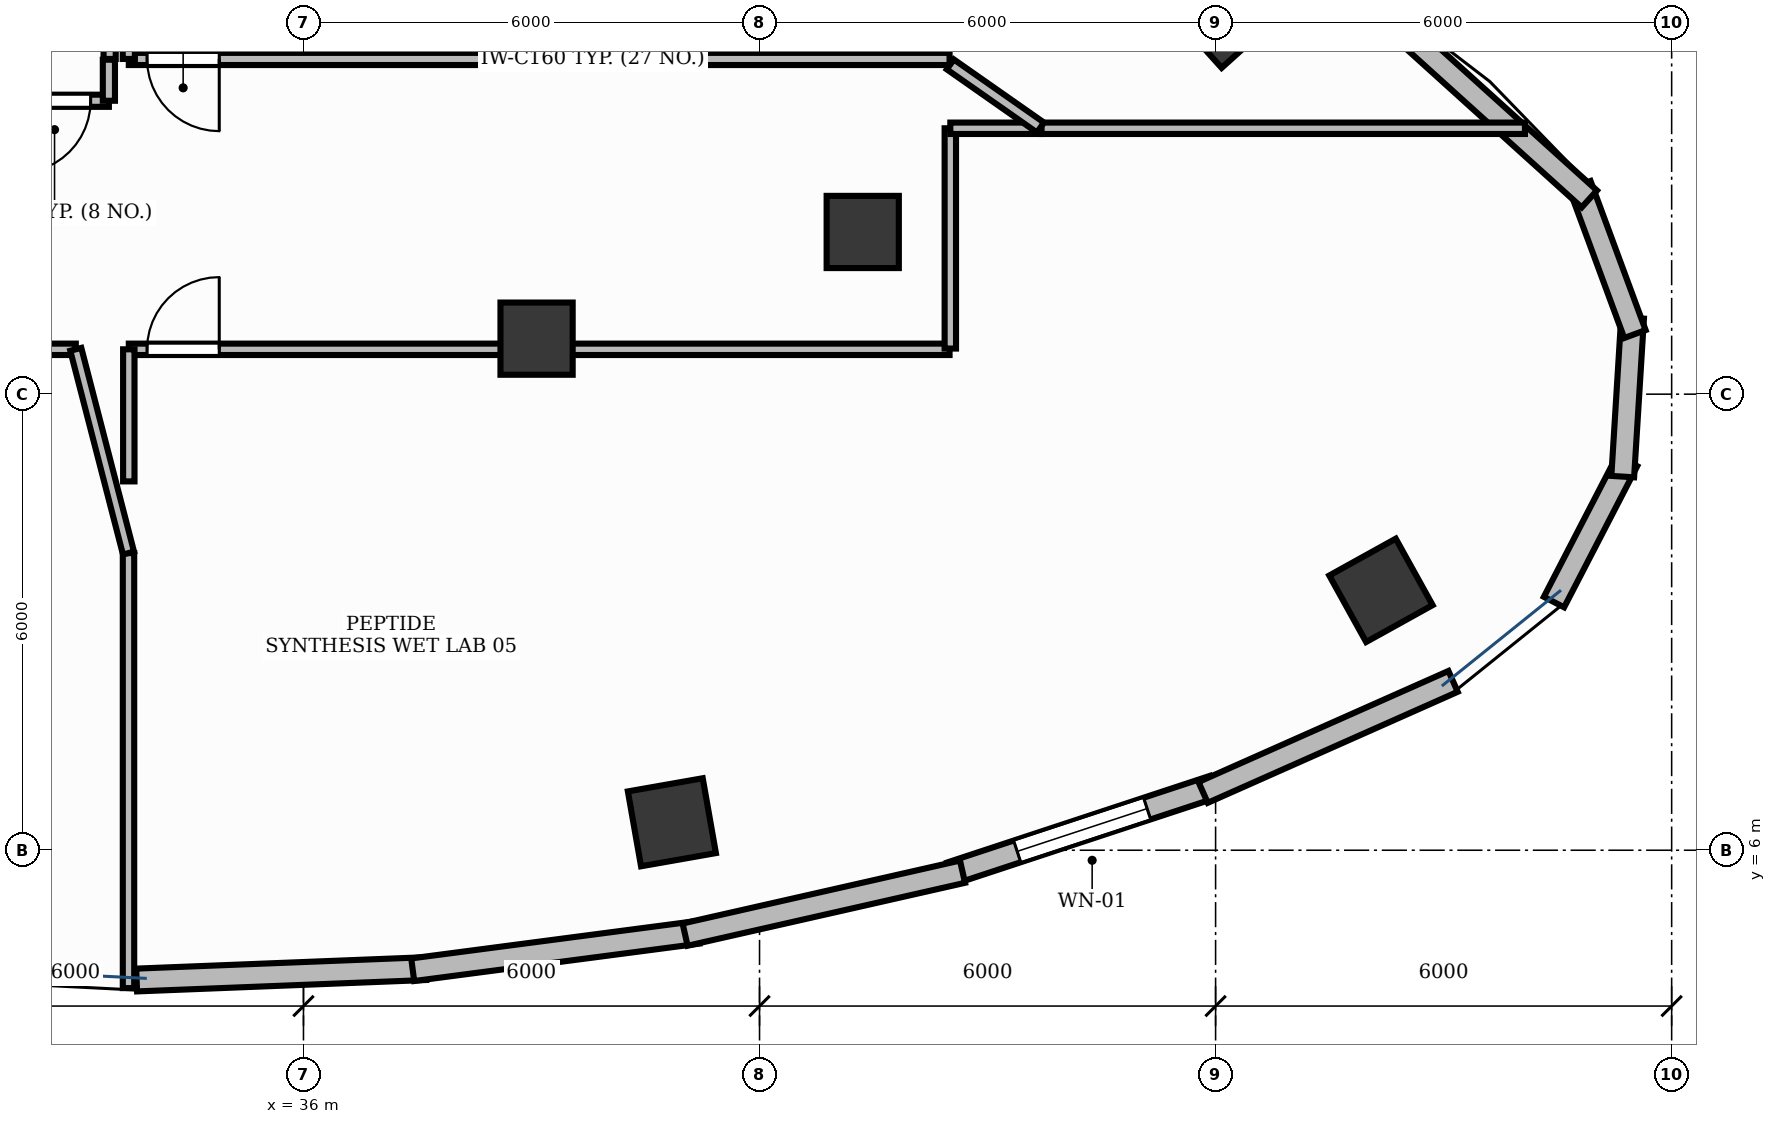
"""IFC4 building model, lengths in metres.
Left out: names, types, materials, properties, quantities, classifications, styles, units other than length and angle.
Written with IfcOpenShell. Run it as: python <this file> out.ifc"""

import sys

from ifc_helpers import new_model, si_unit, direction, frame, frame_2d, origin, origin_2d, place, context, subcontext, project, spatial, rectangle, extrude, element, fill, save


model = new_model("IFC4")
c1 = context("Model", 3, precision=1e-05, world=origin(), true_north=direction((0.0, 1.0)))
c2 = subcontext(c1, "Body", "Model", "MODEL_VIEW")
j1 = project(units=[si_unit("LENGTHUNIT", "METRE"), si_unit("PLANEANGLEUNIT", "RADIAN")], contexts=[c1])
p1 = place(None, origin())
s1 = spatial("IfcSite", under=j1, at=p1, CompositionType="ELEMENT")
p2 = place(p1, origin())
s2 = spatial("IfcBuilding", under=s1, at=p2, CompositionType="ELEMENT")
p3 = place(p2, frame((0.0, 0.0, 231.0)))
s3 = spatial("IfcBuildingStorey", under=s2, at=p3, CompositionType="ELEMENT", Elevation=231.0)
p4 = place(p3, frame((40.847, 6.368, -0.0), z_axis=(0.0, 0.0, 1.0), x_axis=(0.984868307662, 0.173304404339, 0.0)))
e1 = element("IfcColumn", 1, at=p4, inside=s3, PredefinedType="COLUMN", context=c2, shape_type="SweptSolid", body=[
    extrude(rectangle(XDim=1.0, YDim=1.0, at=origin_2d()), origin(), (0.0, 0.0, 1.0), 3.901),
])
p5 = place(p3, frame((39.067, 12.73, -0.0), z_axis=(0.0, 0.0, 1.0), x_axis=(1.0, 0.0, 0.0)))
e2 = element("IfcColumn", 2, at=p5, inside=s3, PredefinedType="COLUMN", context=c2, shape_type="SweptSolid", body=[
    extrude(rectangle(XDim=0.95, YDim=0.95, at=origin_2d()), origin(), (0.0, 0.0, 1.0), 3.901),
])
p6 = place(p3, frame((50.176, 9.419, -0.0), z_axis=(0.0, 0.0, 1.0), x_axis=(0.874535078577, 0.484962262797, 0.0)))
e3 = element("IfcColumn", 3, at=p6, inside=s3, PredefinedType="COLUMN", context=c2, shape_type="SweptSolid", body=[
    extrude(rectangle(XDim=1.0, YDim=1.0, at=origin_2d()), origin(), (0.0, 0.0, 1.0), 3.901),
])
p7 = place(p3, frame((43.358, 14.134, -0.0), z_axis=(0.0, 0.0, 1.0), x_axis=(1.0, 0.0, 0.0)))
e4 = element("IfcColumn", 4, at=p7, inside=s3, PredefinedType="COLUMN", context=c2, shape_type="SweptSolid", body=[
    extrude(rectangle(XDim=0.95, YDim=0.95, at=origin_2d()), origin(), (0.0, 0.0, 1.0), 3.901),
])
p8 = place(p3, frame((48.116, 16.999, -0.0), z_axis=(0.0, 0.0, 1.0), x_axis=(-0.669130606359, 0.743144825477, 0.0)))
e5 = element("IfcColumn", 5, at=p8, inside=s3, PredefinedType="COLUMN", context=c2, shape_type="SweptSolid", body=[
    extrude(rectangle(XDim=1.0, YDim=1.0, at=origin_2d()), origin(), (0.0, 0.0, 1.0), 3.901),
])
p9 = place(p3, frame((44.516, 5.697, 0.0), z_axis=(0.0, 0.0, 1.0), x_axis=(0.949704682455, 0.313146956114, 0.0)))
e6 = element("IfcWall", 6, at=p9, inside=s3, PredefinedType="STANDARD", context=c2, shape_type="SweptSolid", body=[
    extrude(rectangle(XDim=3.639, YDim=0.3, at=frame_2d((1.82, 0.0))), origin(), (0.0, 0.0, 1.0), 3.9),
])
p10 = place(p9, frame((0.92, 0.0, 0.9)))
e7 = element("IfcOpeningElement", 7, at=p10, cuts=e6, PredefinedType="OPENING", context=c2, shape_type="SweptSolid", body=[
    extrude(rectangle(XDim=1.8, YDim=2.1, at=frame_2d((0.9, 1.05))), frame((0.0, 0.165, 0.0), z_axis=(0.0, -1.0, 0.0), x_axis=(1.0, 0.0, 0.0)), (0.0, 0.0, 1.0), 0.33),
])
p11 = place(p3, frame((33.805, 4.292, 0.0), z_axis=(0.0, 0.0, 1.0), x_axis=(0.999221923177, 0.039440439173, 0.0)))
e8 = element("IfcWall", 8, at=p11, inside=s3, PredefinedType="STANDARD", context=c2, shape_type="SweptSolid", body=[
    extrude(rectangle(XDim=3.807, YDim=0.3, at=frame_2d((1.903, 0.0))), origin(), (0.0, 0.0, 1.0), 3.9),
])
p12 = place(p3, frame((37.437, 4.428, 0.0), z_axis=(0.0, 0.0, 1.0), x_axis=(0.991512801574, 0.130009093201, 0.0)))
e9 = element("IfcWall", 9, at=p12, inside=s3, PredefinedType="STANDARD", context=c2, shape_type="SweptSolid", body=[
    extrude(rectangle(XDim=3.786, YDim=0.3, at=frame_2d((1.893, 0.0))), origin(), (0.0, 0.0, 1.0), 3.9),
])
p13 = place(p3, frame((41.021, 4.89, 0.0), z_axis=(0.0, 0.0, 1.0), x_axis=(0.975241674184, 0.221141757557, 0.0)))
e10 = element("IfcWall", 10, at=p13, inside=s3, PredefinedType="STANDARD", context=c2, shape_type="SweptSolid", body=[
    extrude(rectangle(XDim=3.743, YDim=0.3, at=frame_2d((1.871, 0.0))), origin(), (0.0, 0.0, 1.0), 3.9),
])
p14 = place(p3, frame((47.836, 6.761, 0.0), z_axis=(0.0, 0.0, 1.0), x_axis=(0.913940198441, 0.405848880341, 0.0)))
e11 = element("IfcWall", 11, at=p14, inside=s3, PredefinedType="STANDARD", context=c2, shape_type="SweptSolid", body=[
    extrude(rectangle(XDim=3.598, YDim=0.3, at=frame_2d((1.799, 0.0))), origin(), (0.0, 0.0, 1.0), 3.9),
])
p15 = place(p3, frame((52.452, 9.265, 0.0), z_axis=(0.0, 0.0, 1.0), x_axis=(0.459683297138, 0.888082916361, 0.0)))
e12 = element("IfcWall", 12, at=p15, inside=s3, PredefinedType="STANDARD", context=c2, shape_type="SweptSolid", body=[
    extrude(rectangle(XDim=2.092, YDim=0.3, at=frame_2d((1.046, 0.0))), origin(), (0.0, 0.0, 1.0), 3.9),
])
for number, where, z_axis, x_axis in (
    (13, (53.356, 10.915, 0.0), (0.0, 0.0, 1.0), (0.062, 0.998, 0.0)),
    (14, (53.517, 12.791, 0.0), (0.0, 0.0, 1.0), (-0.346, 0.938, 0.0)),
):
    element("IfcWall", number, at=place(p3, frame(where, z_axis=z_axis, x_axis=x_axis)), inside=s3, PredefinedType="STANDARD", context=c2, shape_type="SweptSolid", body=[
        extrude(rectangle(XDim=2.091, YDim=0.3, at=frame_2d((1.046, 0.0))), origin(), (0.0, 0.0, 1.0), 3.9),
    ])
p16 = place(p3, frame((52.917, 14.569, 0.0), z_axis=(0.0, 0.0, 1.0), x_axis=(-0.742037796493, 0.670358045059, 0.0)))
e15 = element("IfcWall", 15, at=p16, inside=s3, PredefinedType="STANDARD", context=c2, shape_type="SweptSolid", body=[
    extrude(rectangle(XDim=3.685, YDim=0.3, at=frame_2d((1.843, 0.0))), origin(), (0.0, 0.0, 1.0), 3.9),
])
p17 = place(p3, frame((33.44, 15.86, 0.0), z_axis=(0.0, 0.0, 1.0), x_axis=(-1.0, 0.0, 0.0)))
e16 = element("IfcWall", 16, at=p17, inside=s3, PredefinedType="PARTITIONING", context=c2, shape_type="SweptSolid", body=[
    extrude(rectangle(XDim=3.28, YDim=0.16, at=frame_2d((1.64, 0.0))), origin(), (0.0, 0.0, 1.0), 2.91),
])
p18 = place(p17, frame((0.24, 0.0, 0.0)))
e17 = element("IfcOpeningElement", 17, at=p18, cuts=e16, PredefinedType="OPENING", context=c2, shape_type="SweptSolid", body=[
    extrude(rectangle(XDim=0.95, YDim=2.15, at=frame_2d((0.475, 1.075))), frame((0.0, 0.095, 0.0), z_axis=(0.0, -1.0, 0.0), x_axis=(1.0, 0.0, 0.0)), (0.0, 0.0, 1.0), 0.19),
])
p19 = place(p3, frame((20.698, 12.59, 0.0), z_axis=(0.0, 0.0, 1.0), x_axis=(1.0, 0.0, 0.0)))
e18 = element("IfcWall", 18, at=p19, inside=s3, PredefinedType="PARTITIONING", context=c2, shape_type="SweptSolid", body=[
    extrude(rectangle(XDim=12.307, YDim=0.15, at=frame_2d((6.153, 0.0))), origin(), (0.0, 0.0, 1.0), 2.91),
])
p20 = place(p19, frame((5.927, 0.0, 0.0)))
e19 = element("IfcOpeningElement", 19, at=p20, cuts=e18, PredefinedType="OPENING", context=c2, shape_type="SweptSolid", body=[
    extrude(rectangle(XDim=0.95, YDim=2.15, at=frame_2d((0.475, 1.075))), frame((0.0, 0.09, 0.0), z_axis=(0.0, -1.0, 0.0), x_axis=(1.0, 0.0, 0.0)), (0.0, 0.0, 1.0), 0.18),
])
p21 = place(p3, frame((33.702, 12.59, 0.0), z_axis=(0.0, 0.0, 1.0), x_axis=(1.0, 0.0, 0.0)))
e20 = element("IfcWall", 20, at=p21, inside=s3, PredefinedType="PARTITIONING", context=c2, shape_type="SweptSolid", body=[
    extrude(rectangle(XDim=10.798, YDim=0.15, at=frame_2d((5.399, 0.0))), origin(), (0.0, 0.0, 1.0), 2.91),
])
p22 = place(p21, frame((0.24, 0.0, 0.0)))
e21 = element("IfcOpeningElement", 21, at=p22, cuts=e20, PredefinedType="OPENING", context=c2, shape_type="SweptSolid", body=[
    extrude(rectangle(XDim=0.95, YDim=2.15, at=frame_2d((0.475, 1.075))), frame((0.0, 0.09, 0.0), z_axis=(0.0, -1.0, 0.0), x_axis=(1.0, 0.0, 0.0)), (0.0, 0.0, 1.0), 0.18),
])
p23 = place(p3, frame((44.5, 16.41, 0.0), z_axis=(0.0, 0.0, 1.0), x_axis=(-1.0, 0.0, 0.0)))
e22 = element("IfcWall", 22, at=p23, inside=s3, PredefinedType="PARTITIONING", context=c2, shape_type="SweptSolid", body=[
    extrude(rectangle(XDim=10.798, YDim=0.16, at=frame_2d((5.399, 0.0))), origin(), (0.0, 0.0, 1.0), 2.91),
])
p24 = place(p23, frame((9.608, 0.0, 0.0)))
e23 = element("IfcOpeningElement", 23, at=p24, cuts=e22, PredefinedType="OPENING", context=c2, shape_type="SweptSolid", body=[
    extrude(rectangle(XDim=0.95, YDim=2.15, at=frame_2d((0.475, 1.075))), frame((0.0, 0.095, 0.0), z_axis=(0.0, -1.0, 0.0), x_axis=(1.0, 0.0, 0.0)), (0.0, 0.0, 1.0), 0.19),
])
p25 = place(p3, frame((33.44, 16.4, 0.0), z_axis=(0.0, 0.0, 1.0), x_axis=(0.0, -1.0, 0.0)))
e24 = element("IfcWall", 24, at=p25, inside=s3, PredefinedType="PARTITIONING", context=c2, shape_type="SweptSolid", body=[
    extrude(rectangle(XDim=0.54, YDim=0.16, at=frame_2d((0.27, 0.0))), origin(), (0.0, 0.0, 1.0), 2.91),
])
p26 = place(p3, frame((33.45, 18.09, 0.0), z_axis=(0.0, 0.0, 1.0), x_axis=(0.0, -1.0, 0.0)))
e25 = element("IfcWall", 25, at=p26, inside=s3, PredefinedType="PARTITIONING", context=c2, shape_type="SweptSolid", body=[
    extrude(rectangle(XDim=1.68, YDim=0.16, at=frame_2d((0.84, 0.0))), origin(), (0.0, 0.0, 1.0), 2.91),
])
p27 = place(p3, frame((33.698, 9.909, 0.0), z_axis=(0.0, 0.0, 1.0), x_axis=(0.0, -1.0, 0.0)))
e26 = element("IfcWall", 26, at=p27, inside=s3, PredefinedType="PARTITIONING", context=c2, shape_type="SweptSolid", body=[
    extrude(rectangle(XDim=5.723, YDim=0.15, at=frame_2d((2.862, 0.0))), origin(), (0.0, 0.0, 1.0), 2.91),
])
p28 = place(p3, frame((33.005, 12.59, 0.0), z_axis=(0.0, 0.0, 1.0), x_axis=(0.250389945948, -0.968145069175, 0.0)))
e27 = element("IfcWall", 27, at=p28, inside=s3, PredefinedType="PARTITIONING", context=c2, shape_type="SweptSolid", body=[
    extrude(rectangle(XDim=2.769, YDim=0.15, at=frame_2d((1.385, 0.0))), origin(), (0.0, 0.0, 1.0), 2.91),
])
p29 = place(p3, frame((44.51, 12.6, 0.0), z_axis=(0.0, 0.0, 1.0), x_axis=(0.0, 1.0, 0.0)))
e28 = element("IfcWall", 28, at=p29, inside=s3, PredefinedType="PARTITIONING", context=c2, shape_type="SweptSolid", body=[
    extrude(rectangle(XDim=2.898, YDim=0.15, at=frame_2d((1.449, 0.0))), origin(), (0.0, 0.0, 1.0), 2.91),
])
p30 = place(p3, frame((44.51, 15.498, 0.0), z_axis=(0.0, 0.0, 1.0), x_axis=(1.0, 0.0, 0.0)))
e29 = element("IfcWall", 29, at=p30, inside=s3, PredefinedType="PARTITIONING", context=c2, shape_type="SweptSolid", body=[
    extrude(rectangle(XDim=1.193, YDim=0.15, at=frame_2d((0.596, 0.0))), origin(), (0.0, 0.0, 1.0), 2.91),
])
p31 = place(p3, frame((45.71, 15.498, 0.0), z_axis=(0.0, 0.0, 1.0), x_axis=(1.0, 0.0, 0.0)))
e30 = element("IfcWall", 30, at=p31, inside=s3, PredefinedType="PARTITIONING", context=c2, shape_type="SweptSolid", body=[
    extrude(rectangle(XDim=6.36, YDim=0.15, at=frame_2d((3.18, 0.0))), origin(), (0.0, 0.0, 1.0), 2.91),
])
p32 = place(p3, frame((33.702, 10.852, 0.0), z_axis=(0.0, 0.0, 1.0), x_axis=(0.0, 1.0, 0.0)))
e31 = element("IfcWall", 31, at=p32, inside=s3, PredefinedType="PARTITIONING", context=c2, shape_type="SweptSolid", body=[
    extrude(rectangle(XDim=1.738, YDim=0.15, at=frame_2d((0.869, 0.0))), origin(), (0.0, 0.0, 1.0), 2.91),
])
p33 = place(p3, frame((45.696, 15.508, 0.0), z_axis=(0.0, 0.0, 1.0), x_axis=(-0.819144755114, 0.573586846231, 0.0)))
e32 = element("IfcWall", 32, at=p33, inside=s3, PredefinedType="PARTITIONING", context=c2, shape_type="SweptSolid", body=[
    extrude(rectangle(XDim=1.448, YDim=0.16, at=frame_2d((0.724, 0.0))), origin(), (0.0, 0.0, 1.0), 2.91),
])
p34 = place(p3, frame((33.702, 16.41, 0.0), z_axis=(0.0, 0.0, 1.0), x_axis=(0.0, 1.0, 0.0)))
e33 = element("IfcWall", 33, at=p34, inside=s3, PredefinedType="PARTITIONING", context=c2, shape_type="SweptSolid", body=[
    extrude(rectangle(XDim=1.68, YDim=0.16, at=frame_2d((0.84, 0.0))), origin(), (0.0, 0.0, 1.0), 2.91),
])
p35 = place(p10, origin())
e34 = element("IfcWindow", 34, at=p35, inside=s3, PartitioningType="SINGLE_PANEL", PredefinedType="WINDOW", context=c2, shape_type="SweptSolid", body=[
    extrude(rectangle(XDim=1.8, YDim=2.1, at=frame_2d((0.9, 1.05))), frame((0.0, 0.03, 0.0), z_axis=(0.0, -1.0, 0.0), x_axis=(1.0, 0.0, 0.0)), (0.0, 0.0, 1.0), 0.06),
])
fill(e7, e34)
p36 = place(p18, origin())
e35 = element("IfcDoor", 35, at=p36, inside=s3, OperationType="SINGLE_SWING_RIGHT", PredefinedType="DOOR", context=c2, shape_type="SweptSolid", body=[
    extrude(rectangle(XDim=0.95, YDim=2.15, at=frame_2d((0.475, 1.075))), frame((0.0, 0.025, 0.0), z_axis=(0.0, -1.0, 0.0), x_axis=(1.0, 0.0, 0.0)), (0.0, 0.0, 1.0), 0.05),
])
fill(e17, e35)
p37 = place(p22, origin())
e36 = element("IfcDoor", 36, at=p37, inside=s3, OperationType="SINGLE_SWING_RIGHT", PredefinedType="DOOR", context=c2, shape_type="SweptSolid", body=[
    extrude(rectangle(XDim=0.95, YDim=2.15, at=frame_2d((0.475, 1.075))), frame((0.0, 0.025, 0.0), z_axis=(0.0, -1.0, 0.0), x_axis=(1.0, 0.0, 0.0)), (0.0, 0.0, 1.0), 0.05),
])
fill(e21, e36)
p38 = place(p24, origin())
e37 = element("IfcDoor", 37, at=p38, inside=s3, OperationType="SINGLE_SWING_LEFT", PredefinedType="DOOR", context=c2, shape_type="SweptSolid", body=[
    extrude(rectangle(XDim=0.95, YDim=2.15, at=frame_2d((0.475, 1.075))), frame((0.0, 0.025, 0.0), z_axis=(0.0, -1.0, 0.0), x_axis=(1.0, 0.0, 0.0)), (0.0, 0.0, 1.0), 0.05),
])
fill(e23, e37)
save(model, sys.argv[1])
